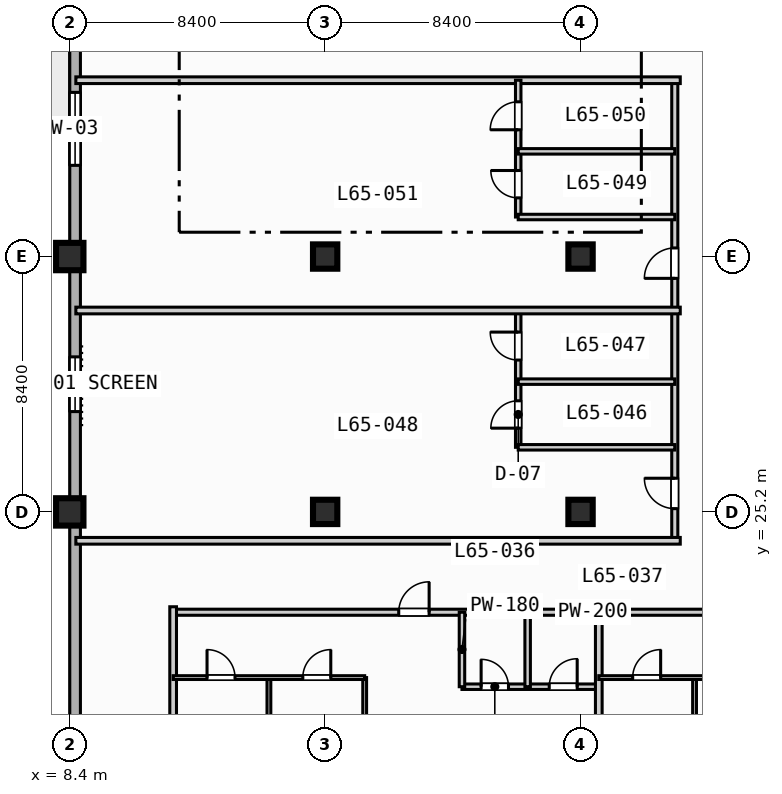
"""IFC4 building model, lengths in metres.
Left out: names, types, materials, properties, quantities, classifications, styles, units other than length and angle.
Written with IfcOpenShell. Run it as: python <this file> out.ifc"""

import sys

from ifc_helpers import new_model, si_unit, direction, frame, frame_2d, origin, origin_2d, place, context, subcontext, project, spatial, rectangle, extrude, element, fill, save


model = new_model("IFC4")
c1 = context("Model", 3, precision=1e-05, world=origin(), true_north=direction((0.0, 1.0)))
c2 = subcontext(c1, "Body", "Model", "MODEL_VIEW")
j1 = project(units=[si_unit("LENGTHUNIT", "METRE"), si_unit("PLANEANGLEUNIT", "RADIAN")], contexts=[c1])
p1 = place(None, origin())
s1 = spatial("IfcSite", under=j1, at=p1, CompositionType="ELEMENT")
p2 = place(p1, origin())
s2 = spatial("IfcBuilding", under=s1, at=p2, CompositionType="ELEMENT")
p3 = place(p2, frame((0.0, 0.0, 263.8)))
s3 = spatial("IfcBuildingStorey", under=s2, at=p3, CompositionType="ELEMENT", Elevation=263.8)
for number, where, z_axis, x_axis in (
    (1, (8.4, 25.2, 0.0), (0.0, 0.0, 1.0), (1.0, 0.0, 0.0)),
    (2, (8.4, 33.6, 0.0), (0.0, 0.0, 1.0), (1.0, 0.0, 0.0)),
):
    element("IfcColumn", number, at=place(p3, frame(where, z_axis=z_axis, x_axis=x_axis)), inside=s3, PredefinedType="COLUMN", context=c2, shape_type="SweptSolid", body=[
        extrude(rectangle(XDim=0.9, YDim=0.9, at=origin_2d()), origin(), (0.0, 0.0, 1.0), 3.7),
    ])
for number, where, z_axis, x_axis in (
    (3, (16.8, 25.2, 0.0), (0.0, 0.0, 1.0), (1.0, 0.0, 0.0)),
    (4, (16.8, 33.6, 0.0), (0.0, 0.0, 1.0), (1.0, 0.0, 0.0)),
    (5, (25.2, 25.2, 0.0), (0.0, 0.0, 1.0), (1.0, 0.0, 0.0)),
    (6, (25.2, 33.6, 0.0), (0.0, 0.0, 1.0), (1.0, 0.0, 0.0)),
):
    element("IfcColumn", number, at=place(p3, frame(where, z_axis=z_axis, x_axis=x_axis)), inside=s3, PredefinedType="COLUMN", context=c2, shape_type="SweptSolid", body=[
        extrude(rectangle(XDim=0.8, YDim=0.8, at=origin_2d()), origin(), (0.0, 0.0, 1.0), 3.7),
    ])
p4 = place(p3, frame((8.575, 11.575, 0.0), z_axis=(0.0, 0.0, 1.0), x_axis=(0.0, 1.0, 0.0)))
e7 = element("IfcWall", 7, at=p4, inside=s3, PredefinedType="STANDARD", context=c2, shape_type="SweptSolid", body=[
    extrude(rectangle(XDim=60.85, YDim=0.35, at=frame_2d((30.425, 0.0))), origin(), (0.0, 0.0, 1.0), 3.47),
])
p5 = place(p4, frame((33.925, 0.0, 0.0)))
e8 = element("IfcOpeningElement", 8, at=p5, cuts=e7, PredefinedType="OPENING", context=c2, shape_type="SweptSolid", body=[
    extrude(rectangle(XDim=1.4, YDim=2.2, at=frame_2d((0.7, 1.1))), frame((0.0, 0.185, 0.0), z_axis=(0.0, -1.0, 0.0), x_axis=(1.0, 0.0, 0.0)), (0.0, 0.0, 1.0), 0.37),
])
p6 = place(p4, frame((16.925, 0.0, 0.85)))
e9 = element("IfcOpeningElement", 9, at=p6, cuts=e7, PredefinedType="OPENING", context=c2, shape_type="SweptSolid", body=[
    extrude(rectangle(XDim=1.8, YDim=1.8, at=frame_2d((0.9, 0.9))), frame((0.0, 0.185, 0.0), z_axis=(0.0, -1.0, 0.0), x_axis=(1.0, 0.0, 0.0)), (0.0, 0.0, 1.0), 0.37),
])
p7 = place(p4, frame((25.025, 0.0, 0.85)))
e10 = element("IfcOpeningElement", 10, at=p7, cuts=e7, PredefinedType="OPENING", context=c2, shape_type="SweptSolid", body=[
    extrude(rectangle(XDim=2.4, YDim=1.95, at=frame_2d((1.2, 0.975))), frame((0.0, 0.185, 0.0), z_axis=(0.0, -1.0, 0.0), x_axis=(1.0, 0.0, 0.0)), (0.0, 0.0, 1.0), 0.37),
])
p8 = place(p4, frame((41.825, 0.0, 0.85)))
e11 = element("IfcOpeningElement", 11, at=p8, cuts=e7, PredefinedType="OPENING", context=c2, shape_type="SweptSolid", body=[
    extrude(rectangle(XDim=2.4, YDim=1.95, at=frame_2d((1.2, 0.975))), frame((0.0, 0.185, 0.0), z_axis=(0.0, -1.0, 0.0), x_axis=(1.0, 0.0, 0.0)), (0.0, 0.0, 1.0), 0.37),
])
p9 = place(p3, frame((11.8, 21.9, 0.0), z_axis=(0.0, 0.0, 1.0), x_axis=(1.0, 0.0, 0.0)))
e12 = element("IfcWall", 12, at=p9, inside=s3, PredefinedType="PARTITIONING", context=c2, shape_type="SweptSolid", body=[
    extrude(rectangle(XDim=27.6, YDim=0.2, at=frame_2d((13.8, 0.0))), origin(), (0.0, 0.0, 1.0), 3.47),
])
p10 = place(p9, frame((7.42, 0.0, 0.0)))
e13 = element("IfcOpeningElement", 13, at=p10, cuts=e12, PredefinedType="OPENING", context=c2, shape_type="SweptSolid", body=[
    extrude(rectangle(XDim=1.0, YDim=2.15, at=frame_2d((0.5, 1.075))), frame((0.0, 0.11, 0.0), z_axis=(0.0, -1.0, 0.0), x_axis=(1.0, 0.0, 0.0)), (0.0, 0.0, 1.0), 0.22),
])
p11 = place(p9, frame((21.22, 0.0, 0.0)))
e14 = element("IfcOpeningElement", 14, at=p11, cuts=e12, PredefinedType="OPENING", context=c2, shape_type="SweptSolid", body=[
    extrude(rectangle(XDim=1.0, YDim=2.15, at=frame_2d((0.5, 1.075))), frame((0.0, 0.11, 0.0), z_axis=(0.0, -1.0, 0.0), x_axis=(1.0, 0.0, 0.0)), (0.0, 0.0, 1.0), 0.22),
])
p12 = place(p3, frame((11.8, 8.6, 0.0), z_axis=(0.0, 0.0, 1.0), x_axis=(0.0, 1.0, 0.0)))
e15 = element("IfcWall", 15, at=p12, inside=s3, PredefinedType="PARTITIONING", context=c2, shape_type="SweptSolid", body=[
    extrude(rectangle(XDim=13.48, YDim=0.22, at=frame_2d((6.74, 0.0))), origin(), (0.0, 0.0, 1.0), 3.47),
])
p13 = place(p3, frame((21.3, 19.45, 0.0), z_axis=(0.0, 0.0, 1.0), x_axis=(1.0, 0.0, 0.0)))
e16 = element("IfcWall", 16, at=p13, inside=s3, PredefinedType="PLUMBINGWALL", context=c2, shape_type="SweptSolid", body=[
    extrude(rectangle(XDim=4.5, YDim=0.18, at=frame_2d((2.25, 0.0))), origin(), (0.0, 0.0, 1.0), 3.47),
])
p14 = place(p13, frame((0.63, 0.0, 0.0)))
e17 = element("IfcOpeningElement", 17, at=p14, cuts=e16, PredefinedType="OPENING", context=c2, shape_type="SweptSolid", body=[
    extrude(rectangle(XDim=0.9, YDim=2.1, at=frame_2d((0.45, 1.05))), frame((0.0, 0.1, 0.0), z_axis=(0.0, -1.0, 0.0), x_axis=(1.0, 0.0, 0.0)), (0.0, 0.0, 1.0), 0.2),
])
p15 = place(p13, frame((2.87, 0.0, 0.0)))
e18 = element("IfcOpeningElement", 18, at=p15, cuts=e16, PredefinedType="OPENING", context=c2, shape_type="SweptSolid", body=[
    extrude(rectangle(XDim=0.92, YDim=2.1, at=frame_2d((0.46, 1.05))), frame((0.0, 0.1, 0.0), z_axis=(0.0, -1.0, 0.0), x_axis=(1.0, 0.0, 0.0)), (0.0, 0.0, 1.0), 0.2),
])
for number, where, z_axis, x_axis in (
    (19, (21.3, 19.45, 0.0), (0.0, 0.0, 1.0), (0.0, 1.0, 0.0)),
    (20, (23.46, 19.45, 0.0), (0.0, 0.0, 1.0), (0.0, 1.0, 0.0)),
):
    element("IfcWall", number, at=place(p3, frame(where, z_axis=z_axis, x_axis=x_axis)), inside=s3, PredefinedType="PLUMBINGWALL", context=c2, shape_type="SweptSolid", body=[
        extrude(rectangle(XDim=2.45, YDim=0.18, at=frame_2d((1.225, 0.0))), origin(), (0.0, 0.0, 1.0), 3.47),
    ])
for number, where, z_axis, x_axis in (
    (21, (14.95, 8.75, 0.0), (0.0, 0.0, 1.0), (0.0, 1.0, 0.0)),
    (22, (18.1, 8.75, 0.0), (0.0, 0.0, 1.0), (0.0, 1.0, 0.0)),
):
    element("IfcWall", number, at=place(p3, frame(where, z_axis=z_axis, x_axis=x_axis)), inside=s3, PredefinedType="PARTITIONING", context=c2, shape_type="SweptSolid", body=[
        extrude(rectangle(XDim=11.0, YDim=0.125, at=frame_2d((5.5, 0.0))), origin(), (0.0, 0.0, 1.0), 3.47),
    ])
p16 = place(p3, frame((11.8, 19.75, 0.0), z_axis=(0.0, 0.0, 1.0), x_axis=(1.0, 0.0, 0.0)))
e23 = element("IfcWall", 23, at=p16, inside=s3, PredefinedType="PARTITIONING", context=c2, shape_type="SweptSolid", body=[
    extrude(rectangle(XDim=6.3, YDim=0.125, at=frame_2d((3.15, 0.0))), origin(), (0.0, 0.0, 1.0), 3.47),
])
p17 = place(p16, frame((1.115, 0.0, 0.0)))
e24 = element("IfcOpeningElement", 24, at=p17, cuts=e23, PredefinedType="OPENING", context=c2, shape_type="SweptSolid", body=[
    extrude(rectangle(XDim=0.92, YDim=2.1, at=frame_2d((0.46, 1.05))), frame((0.0, 0.073, 0.0), z_axis=(0.0, -1.0, 0.0), x_axis=(1.0, 0.0, 0.0)), (0.0, 0.0, 1.0), 0.145),
])
p18 = place(p16, frame((4.265, 0.0, 0.0)))
e25 = element("IfcOpeningElement", 25, at=p18, cuts=e23, PredefinedType="OPENING", context=c2, shape_type="SweptSolid", body=[
    extrude(rectangle(XDim=0.92, YDim=2.1, at=frame_2d((0.46, 1.05))), frame((0.0, 0.073, 0.0), z_axis=(0.0, -1.0, 0.0), x_axis=(1.0, 0.0, 0.0)), (0.0, 0.0, 1.0), 0.145),
])
p19 = place(p3, frame((25.8, 8.6, 0.0), z_axis=(0.0, 0.0, 1.0), x_axis=(0.0, 1.0, 0.0)))
e26 = element("IfcWall", 26, at=p19, inside=s3, PredefinedType="PARTITIONING", context=c2, shape_type="SweptSolid", body=[
    extrude(rectangle(XDim=13.48, YDim=0.22, at=frame_2d((6.74, 0.0))), origin(), (0.0, 0.0, 1.0), 3.47),
])
p20 = place(p3, frame((28.95, 8.75, 0.0), z_axis=(0.0, 0.0, 1.0), x_axis=(0.0, 1.0, 0.0)))
e27 = element("IfcWall", 27, at=p20, inside=s3, PredefinedType="PARTITIONING", context=c2, shape_type="SweptSolid", body=[
    extrude(rectangle(XDim=11.0, YDim=0.125, at=frame_2d((5.5, 0.0))), origin(), (0.0, 0.0, 1.0), 3.47),
])
p21 = place(p3, frame((25.8, 19.75, 0.0), z_axis=(0.0, 0.0, 1.0), x_axis=(1.0, 0.0, 0.0)))
e28 = element("IfcWall", 28, at=p21, inside=s3, PredefinedType="PARTITIONING", context=c2, shape_type="SweptSolid", body=[
    extrude(rectangle(XDim=6.3, YDim=0.125, at=frame_2d((3.15, 0.0))), origin(), (0.0, 0.0, 1.0), 3.47),
])
p22 = place(p21, frame((1.115, 0.0, 0.0)))
e29 = element("IfcOpeningElement", 29, at=p22, cuts=e28, PredefinedType="OPENING", context=c2, shape_type="SweptSolid", body=[
    extrude(rectangle(XDim=0.92, YDim=2.1, at=frame_2d((0.46, 1.05))), frame((0.0, 0.073, 0.0), z_axis=(0.0, -1.0, 0.0), x_axis=(1.0, 0.0, 0.0)), (0.0, 0.0, 1.0), 0.145),
])
p23 = place(p21, frame((4.265, 0.0, 0.0)))
e30 = element("IfcOpeningElement", 30, at=p23, cuts=e28, PredefinedType="OPENING", context=c2, shape_type="SweptSolid", body=[
    extrude(rectangle(XDim=0.92, YDim=2.1, at=frame_2d((0.46, 1.05))), frame((0.0, 0.073, 0.0), z_axis=(0.0, -1.0, 0.0), x_axis=(1.0, 0.0, 0.0)), (0.0, 0.0, 1.0), 0.145),
])
p24 = place(p3, frame((28.3, 24.25, 0.0), z_axis=(0.0, 0.0, 1.0), x_axis=(0.0, 1.0, 0.0)))
e31 = element("IfcWall", 31, at=p24, inside=s3, PredefinedType="PARTITIONING", context=c2, shape_type="SweptSolid", body=[
    extrude(rectangle(XDim=15.15, YDim=0.2, at=frame_2d((7.575, 0.0))), origin(), (0.0, 0.0, 1.0), 3.47),
])
p25 = place(p24, frame((1.058, 0.0, 0.0)))
e32 = element("IfcOpeningElement", 32, at=p25, cuts=e31, PredefinedType="OPENING", context=c2, shape_type="SweptSolid", body=[
    extrude(rectangle(XDim=1.0, YDim=2.15, at=frame_2d((0.5, 1.075))), frame((0.0, 0.11, 0.0), z_axis=(0.0, -1.0, 0.0), x_axis=(1.0, 0.0, 0.0)), (0.0, 0.0, 1.0), 0.22),
])
p26 = place(p24, frame((8.633, 0.0, 0.0)))
e33 = element("IfcOpeningElement", 33, at=p26, cuts=e31, PredefinedType="OPENING", context=c2, shape_type="SweptSolid", body=[
    extrude(rectangle(XDim=1.0, YDim=2.15, at=frame_2d((0.5, 1.075))), frame((0.0, 0.11, 0.0), z_axis=(0.0, -1.0, 0.0), x_axis=(1.0, 0.0, 0.0)), (0.0, 0.0, 1.0), 0.22),
])
p27 = place(p3, frame((8.6, 24.25, 0.0), z_axis=(0.0, 0.0, 1.0), x_axis=(1.0, 0.0, 0.0)))
e34 = element("IfcWall", 34, at=p27, inside=s3, PredefinedType="PARTITIONING", context=c2, shape_type="SweptSolid", body=[
    extrude(rectangle(XDim=19.88, YDim=0.22, at=frame_2d((9.94, 0.0))), origin(), (0.0, 0.0, 1.0), 3.47),
])
p28 = place(p3, frame((23.15, 27.325, 0.0), z_axis=(0.0, 0.0, 1.0), x_axis=(0.0, 1.0, 0.0)))
e35 = element("IfcWall", 35, at=p28, inside=s3, PredefinedType="PLUMBINGWALL", context=c2, shape_type="SweptSolid", body=[
    extrude(rectangle(XDim=4.5, YDim=0.18, at=frame_2d((2.25, 0.0))), origin(), (0.0, 0.0, 1.0), 3.47),
])
p29 = place(p28, frame((0.63, 0.0, 0.0)))
e36 = element("IfcOpeningElement", 36, at=p29, cuts=e35, PredefinedType="OPENING", context=c2, shape_type="SweptSolid", body=[
    extrude(rectangle(XDim=0.9, YDim=2.1, at=frame_2d((0.45, 1.05))), frame((0.0, 0.1, 0.0), z_axis=(0.0, -1.0, 0.0), x_axis=(1.0, 0.0, 0.0)), (0.0, 0.0, 1.0), 0.2),
])
p30 = place(p28, frame((2.87, 0.0, 0.0)))
e37 = element("IfcOpeningElement", 37, at=p30, cuts=e35, PredefinedType="OPENING", context=c2, shape_type="SweptSolid", body=[
    extrude(rectangle(XDim=0.92, YDim=2.1, at=frame_2d((0.46, 1.05))), frame((0.0, 0.1, 0.0), z_axis=(0.0, -1.0, 0.0), x_axis=(1.0, 0.0, 0.0)), (0.0, 0.0, 1.0), 0.2),
])
for number, where, z_axis, x_axis in (
    (38, (23.15, 27.325, 0.0), (0.0, 0.0, 1.0), (1.0, 0.0, 0.0)),
    (39, (23.15, 29.485, 0.0), (0.0, 0.0, 1.0), (1.0, 0.0, 0.0)),
):
    element("IfcWall", number, at=place(p3, frame(where, z_axis=z_axis, x_axis=x_axis)), inside=s3, PredefinedType="PLUMBINGWALL", context=c2, shape_type="SweptSolid", body=[
        extrude(rectangle(XDim=5.15, YDim=0.18, at=frame_2d((2.575, 0.0))), origin(), (0.0, 0.0, 1.0), 3.47),
    ])
for number, where, z_axis, x_axis in (
    (40, (8.6, 31.825, 0.0), (0.0, 0.0, 1.0), (1.0, 0.0, 0.0)),
    (41, (8.6, 39.4, 0.0), (0.0, 0.0, 1.0), (1.0, 0.0, 0.0)),
):
    element("IfcWall", number, at=place(p3, frame(where, z_axis=z_axis, x_axis=x_axis)), inside=s3, PredefinedType="PARTITIONING", context=c2, shape_type="SweptSolid", body=[
        extrude(rectangle(XDim=19.88, YDim=0.22, at=frame_2d((9.94, 0.0))), origin(), (0.0, 0.0, 1.0), 3.47),
    ])
p31 = place(p3, frame((23.15, 34.9, 0.0), z_axis=(0.0, 0.0, 1.0), x_axis=(0.0, 1.0, 0.0)))
e42 = element("IfcWall", 42, at=p31, inside=s3, PredefinedType="PLUMBINGWALL", context=c2, shape_type="SweptSolid", body=[
    extrude(rectangle(XDim=4.5, YDim=0.18, at=frame_2d((2.25, 0.0))), origin(), (0.0, 0.0, 1.0), 3.47),
])
p32 = place(p31, frame((0.63, 0.0, 0.0)))
e43 = element("IfcOpeningElement", 43, at=p32, cuts=e42, PredefinedType="OPENING", context=c2, shape_type="SweptSolid", body=[
    extrude(rectangle(XDim=0.9, YDim=2.1, at=frame_2d((0.45, 1.05))), frame((0.0, 0.1, 0.0), z_axis=(0.0, -1.0, 0.0), x_axis=(1.0, 0.0, 0.0)), (0.0, 0.0, 1.0), 0.2),
])
p33 = place(p31, frame((2.87, 0.0, 0.0)))
e44 = element("IfcOpeningElement", 44, at=p33, cuts=e42, PredefinedType="OPENING", context=c2, shape_type="SweptSolid", body=[
    extrude(rectangle(XDim=0.92, YDim=2.1, at=frame_2d((0.46, 1.05))), frame((0.0, 0.1, 0.0), z_axis=(0.0, -1.0, 0.0), x_axis=(1.0, 0.0, 0.0)), (0.0, 0.0, 1.0), 0.2),
])
for number, where, z_axis, x_axis in (
    (45, (23.15, 34.9, 0.0), (0.0, 0.0, 1.0), (1.0, 0.0, 0.0)),
    (46, (23.15, 37.06, 0.0), (0.0, 0.0, 1.0), (1.0, 0.0, 0.0)),
):
    element("IfcWall", number, at=place(p3, frame(where, z_axis=z_axis, x_axis=x_axis)), inside=s3, PredefinedType="PLUMBINGWALL", context=c2, shape_type="SweptSolid", body=[
        extrude(rectangle(XDim=5.15, YDim=0.18, at=frame_2d((2.575, 0.0))), origin(), (0.0, 0.0, 1.0), 3.47),
    ])
p34 = place(p6, origin())
e47 = element("IfcWindow", 47, at=p34, inside=s3, PartitioningType="SINGLE_PANEL", PredefinedType="WINDOW", context=c2, shape_type="SweptSolid", body=[
    extrude(rectangle(XDim=1.8, YDim=1.8, at=frame_2d((0.9, 0.9))), frame((0.0, 0.03, 0.0), z_axis=(0.0, -1.0, 0.0), x_axis=(1.0, 0.0, 0.0)), (0.0, 0.0, 1.0), 0.06),
])
fill(e9, e47)
p35 = place(p7, origin())
e48 = element("IfcWindow", 48, at=p35, inside=s3, PartitioningType="SINGLE_PANEL", PredefinedType="WINDOW", context=c2, shape_type="SweptSolid", body=[
    extrude(rectangle(XDim=2.4, YDim=1.95, at=frame_2d((1.2, 0.975))), frame((0.0, 0.03, 0.0), z_axis=(0.0, -1.0, 0.0), x_axis=(1.0, 0.0, 0.0)), (0.0, 0.0, 1.0), 0.06),
])
fill(e10, e48)
p36 = place(p10, origin())
e49 = element("IfcDoor", 49, at=p36, inside=s3, OperationType="SINGLE_SWING_RIGHT", PredefinedType="DOOR", context=c2, shape_type="SweptSolid", body=[
    extrude(rectangle(XDim=1.0, YDim=2.15, at=frame_2d((0.5, 1.075))), frame((0.0, 0.025, 0.0), z_axis=(0.0, -1.0, 0.0), x_axis=(1.0, 0.0, 0.0)), (0.0, 0.0, 1.0), 0.05),
])
fill(e13, e49)
p37 = place(p14, origin())
e50 = element("IfcDoor", 50, at=p37, inside=s3, OperationType="SINGLE_SWING_LEFT", PredefinedType="DOOR", context=c2, shape_type="SweptSolid", body=[
    extrude(rectangle(XDim=0.9, YDim=2.1, at=frame_2d((0.45, 1.05))), frame((0.0, 0.025, 0.0), z_axis=(0.0, -1.0, 0.0), x_axis=(1.0, 0.0, 0.0)), (0.0, 0.0, 1.0), 0.05),
])
fill(e17, e50)
p38 = place(p15, origin())
e51 = element("IfcDoor", 51, at=p38, inside=s3, OperationType="SINGLE_SWING_RIGHT", PredefinedType="DOOR", context=c2, shape_type="SweptSolid", body=[
    extrude(rectangle(XDim=0.92, YDim=2.1, at=frame_2d((0.46, 1.05))), frame((0.0, 0.025, 0.0), z_axis=(0.0, -1.0, 0.0), x_axis=(1.0, 0.0, 0.0)), (0.0, 0.0, 1.0), 0.05),
])
fill(e18, e51)
p39 = place(p17, origin())
e52 = element("IfcDoor", 52, at=p39, inside=s3, OperationType="SINGLE_SWING_LEFT", PredefinedType="DOOR", context=c2, shape_type="SweptSolid", body=[
    extrude(rectangle(XDim=0.92, YDim=2.1, at=frame_2d((0.46, 1.05))), frame((0.0, 0.025, 0.0), z_axis=(0.0, -1.0, 0.0), x_axis=(1.0, 0.0, 0.0)), (0.0, 0.0, 1.0), 0.05),
])
fill(e24, e52)
p40 = place(p18, origin())
e53 = element("IfcDoor", 53, at=p40, inside=s3, OperationType="SINGLE_SWING_RIGHT", PredefinedType="DOOR", context=c2, shape_type="SweptSolid", body=[
    extrude(rectangle(XDim=0.92, YDim=2.1, at=frame_2d((0.46, 1.05))), frame((0.0, 0.025, 0.0), z_axis=(0.0, -1.0, 0.0), x_axis=(1.0, 0.0, 0.0)), (0.0, 0.0, 1.0), 0.05),
])
fill(e25, e53)
p41 = place(p22, origin())
e54 = element("IfcDoor", 54, at=p41, inside=s3, OperationType="SINGLE_SWING_RIGHT", PredefinedType="DOOR", context=c2, shape_type="SweptSolid", body=[
    extrude(rectangle(XDim=0.92, YDim=2.1, at=frame_2d((0.46, 1.05))), frame((0.0, 0.025, 0.0), z_axis=(0.0, -1.0, 0.0), x_axis=(1.0, 0.0, 0.0)), (0.0, 0.0, 1.0), 0.05),
])
fill(e29, e54)
p42 = place(p25, origin())
e55 = element("IfcDoor", 55, at=p42, inside=s3, OperationType="SINGLE_SWING_RIGHT", PredefinedType="DOOR", context=c2, shape_type="SweptSolid", body=[
    extrude(rectangle(XDim=1.0, YDim=2.15, at=frame_2d((0.5, 1.075))), frame((0.0, 0.025, 0.0), z_axis=(0.0, -1.0, 0.0), x_axis=(1.0, 0.0, 0.0)), (0.0, 0.0, 1.0), 0.05),
])
fill(e32, e55)
p43 = place(p26, origin())
e56 = element("IfcDoor", 56, at=p43, inside=s3, OperationType="SINGLE_SWING_LEFT", PredefinedType="DOOR", context=c2, shape_type="SweptSolid", body=[
    extrude(rectangle(XDim=1.0, YDim=2.15, at=frame_2d((0.5, 1.075))), frame((0.0, 0.025, 0.0), z_axis=(0.0, -1.0, 0.0), x_axis=(1.0, 0.0, 0.0)), (0.0, 0.0, 1.0), 0.05),
])
fill(e33, e56)
p44 = place(p29, origin())
e57 = element("IfcDoor", 57, at=p44, inside=s3, OperationType="SINGLE_SWING_LEFT", PredefinedType="DOOR", context=c2, shape_type="SweptSolid", body=[
    extrude(rectangle(XDim=0.9, YDim=2.1, at=frame_2d((0.45, 1.05))), frame((0.0, 0.025, 0.0), z_axis=(0.0, -1.0, 0.0), x_axis=(1.0, 0.0, 0.0)), (0.0, 0.0, 1.0), 0.05),
])
fill(e36, e57)
p45 = place(p30, origin())
e58 = element("IfcDoor", 58, at=p45, inside=s3, OperationType="SINGLE_SWING_RIGHT", PredefinedType="DOOR", context=c2, shape_type="SweptSolid", body=[
    extrude(rectangle(XDim=0.92, YDim=2.1, at=frame_2d((0.46, 1.05))), frame((0.0, 0.025, 0.0), z_axis=(0.0, -1.0, 0.0), x_axis=(1.0, 0.0, 0.0)), (0.0, 0.0, 1.0), 0.05),
])
fill(e37, e58)
p46 = place(p32, origin())
e59 = element("IfcDoor", 59, at=p46, inside=s3, OperationType="SINGLE_SWING_RIGHT", PredefinedType="DOOR", context=c2, shape_type="SweptSolid", body=[
    extrude(rectangle(XDim=0.9, YDim=2.1, at=frame_2d((0.45, 1.05))), frame((0.0, 0.025, 0.0), z_axis=(0.0, -1.0, 0.0), x_axis=(1.0, 0.0, 0.0)), (0.0, 0.0, 1.0), 0.05),
])
fill(e43, e59)
p47 = place(p33, origin())
e60 = element("IfcDoor", 60, at=p47, inside=s3, OperationType="SINGLE_SWING_LEFT", PredefinedType="DOOR", context=c2, shape_type="SweptSolid", body=[
    extrude(rectangle(XDim=0.92, YDim=2.1, at=frame_2d((0.46, 1.05))), frame((0.0, 0.025, 0.0), z_axis=(0.0, -1.0, 0.0), x_axis=(1.0, 0.0, 0.0)), (0.0, 0.0, 1.0), 0.05),
])
fill(e44, e60)
save(model, sys.argv[1])
